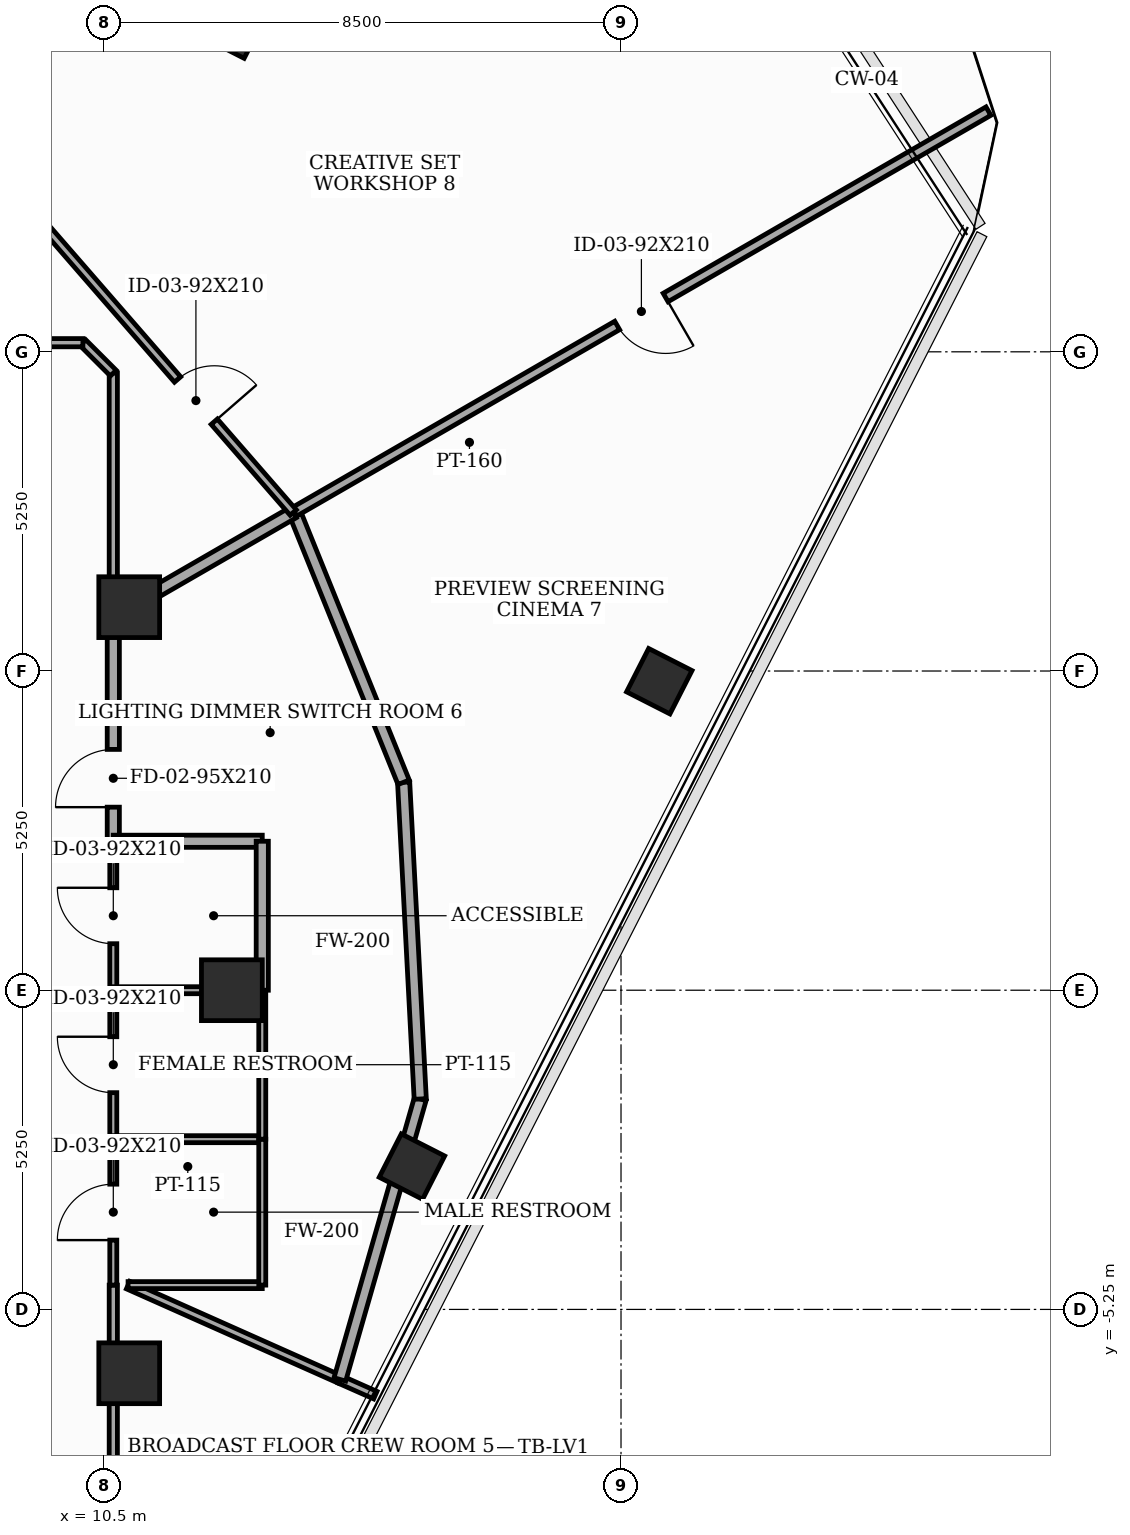
"""IFC4 building model, lengths in metres.
Left out: names, types, materials, properties, quantities, classifications, styles, units other than length and angle.
Written with IfcOpenShell. Run it as: python <this file> out.ifc"""

import sys

from ifc_helpers import new_model, si_unit, direction, frame, frame_2d, origin, origin_2d, place, context, subcontext, project, spatial, rectangle, extrude, element, fill, save


model = new_model("IFC4")
c1 = context("Model", 3, precision=1e-05, world=origin(), true_north=direction((0.0, 1.0)))
c2 = subcontext(c1, "Body", "Model", "MODEL_VIEW")
j1 = project(units=[si_unit("LENGTHUNIT", "METRE"), si_unit("PLANEANGLEUNIT", "RADIAN")], contexts=[c1])
p1 = place(None, origin())
s1 = spatial("IfcSite", under=j1, at=p1, CompositionType="ELEMENT")
p2 = place(p1, origin())
s2 = spatial("IfcBuilding", under=s1, at=p2, CompositionType="ELEMENT")
p3 = place(p2, frame((0.0, 0.0, 270.7)))
s3 = spatial("IfcBuildingStorey", under=s2, at=p3, CompositionType="ELEMENT", Elevation=270.7)
for number, where, z_axis, x_axis in (
    (1, (12.6, 0.0, 0.0), (0.0, 0.0, 1.0), (1.0, 0.0, 0.0)),
    (2, (10.912, 6.3, 0.0), (0.0, 0.0, 1.0), (1.0, 0.0, 0.0)),
    (3, (10.912, -6.3, 0.0), (0.0, 0.0, 1.0), (1.0, 0.0, 0.0)),
):
    element("IfcColumn", number, at=place(p3, frame(where, z_axis=z_axis, x_axis=x_axis)), inside=s3, PredefinedType="COLUMN", context=c2, shape_type="SweptSolid", body=[
        extrude(rectangle(XDim=1.0, YDim=1.0, at=origin_2d()), origin(), (0.0, 0.0, 1.0), 3.7),
    ])
for number, where, z_axis, x_axis in (
    (4, (15.562, -2.901, 0.0), (0.0, 0.0, 1.0), (0.454, 0.891, 0.0)),
    (5, (19.629, 5.082, 0.0), (0.0, 0.0, 1.0), (0.454, 0.891, 0.0)),
    (6, (12.627, 15.865, 0.0), (0.0, 0.0, 1.0), (0.454, 0.891, 0.0)),
):
    element("IfcColumn", number, at=place(p3, frame(where, z_axis=z_axis, x_axis=x_axis)), inside=s3, PredefinedType="COLUMN", context=c2, shape_type="SweptSolid", body=[
        extrude(rectangle(XDim=0.8, YDim=0.8, at=origin_2d()), origin(), (0.0, 0.0, 1.0), 3.7),
    ])
p4 = place(p3, frame((10.65, -10.15, 0.0), z_axis=(0.0, 0.0, 1.0), x_axis=(0.0, 1.0, 0.0)))
e7 = element("IfcWall", 7, at=p4, inside=s3, PredefinedType="PARTITIONING", context=c2, shape_type="SweptSolid", body=[
    extrude(rectangle(XDim=5.3, YDim=0.135, at=frame_2d((2.65, 0.0))), origin(), (0.0, 0.0, 1.0), 2.885),
])
p5 = place(p3, frame((10.65, -4.85, 0.0), z_axis=(0.0, 0.0, 1.0), x_axis=(0.0, 1.0, 0.0)))
e8 = element("IfcWall", 8, at=p5, inside=s3, PredefinedType="PARTITIONING", context=c2, shape_type="SweptSolid", body=[
    extrude(rectangle(XDim=2.4, YDim=0.115, at=frame_2d((1.2, 0.0))), origin(), (0.0, 0.0, 1.0), 3.5),
])
p6 = place(p5, frame((0.74, 0.0, 0.0)))
e9 = element("IfcOpeningElement", 9, at=p6, cuts=e8, PredefinedType="OPENING", context=c2, shape_type="SweptSolid", body=[
    extrude(rectangle(XDim=0.92, YDim=2.1, at=frame_2d((0.46, 1.05))), frame((0.0, 0.067, 0.0), z_axis=(0.0, -1.0, 0.0), x_axis=(1.0, 0.0, 0.0)), (0.0, 0.0, 1.0), 0.135),
])
p7 = place(p3, frame((10.65, -2.45, 0.0), z_axis=(0.0, 0.0, 1.0), x_axis=(0.0, 1.0, 0.0)))
e10 = element("IfcWall", 10, at=p7, inside=s3, PredefinedType="PARTITIONING", context=c2, shape_type="SweptSolid", body=[
    extrude(rectangle(XDim=2.45, YDim=0.115, at=frame_2d((1.225, 0.0))), origin(), (0.0, 0.0, 1.0), 2.885),
])
p8 = place(p7, frame((0.765, 0.0, 0.0)))
e11 = element("IfcOpeningElement", 11, at=p8, cuts=e10, PredefinedType="OPENING", context=c2, shape_type="SweptSolid", body=[
    extrude(rectangle(XDim=0.92, YDim=2.1, at=frame_2d((0.46, 1.05))), frame((0.0, 0.067, 0.0), z_axis=(0.0, -1.0, 0.0), x_axis=(1.0, 0.0, 0.0)), (0.0, 0.0, 1.0), 0.135),
])
p9 = place(p3, frame((10.65, 2.45, 0.0), z_axis=(0.0, 0.0, 1.0), x_axis=(0.0, 1.0, 0.0)))
e12 = element("IfcWall", 12, at=p9, inside=s3, PredefinedType="SOLIDWALL", context=c2, shape_type="SweptSolid", body=[
    extrude(rectangle(XDim=3.699, YDim=0.2, at=frame_2d((1.85, 0.0))), origin(), (0.0, 0.0, 1.0), 3.5),
])
p10 = place(p9, frame((0.561, 0.0, 0.0)))
e13 = element("IfcOpeningElement", 13, at=p10, cuts=e12, PredefinedType="OPENING", context=c2, shape_type="SweptSolid", body=[
    extrude(rectangle(XDim=0.95, YDim=2.1, at=frame_2d((0.475, 1.05))), frame((0.0, 0.11, 0.0), z_axis=(0.0, -1.0, 0.0), x_axis=(1.0, 0.0, 0.0)), (0.0, 0.0, 1.0), 0.22),
])
p11 = place(p3, frame((10.65, 0.0, 0.0), z_axis=(0.0, 0.0, 1.0), x_axis=(0.0, 1.0, 0.0)))
e14 = element("IfcWall", 14, at=p11, inside=s3, PredefinedType="PARTITIONING", context=c2, shape_type="SweptSolid", body=[
    extrude(rectangle(XDim=2.45, YDim=0.115, at=frame_2d((1.225, 0.0))), origin(), (0.0, 0.0, 1.0), 2.885),
])
p12 = place(p11, frame((0.765, 0.0, 0.0)))
e15 = element("IfcOpeningElement", 15, at=p12, cuts=e14, PredefinedType="OPENING", context=c2, shape_type="SweptSolid", body=[
    extrude(rectangle(XDim=0.92, YDim=2.1, at=frame_2d((0.46, 1.05))), frame((0.0, 0.067, 0.0), z_axis=(0.0, -1.0, 0.0), x_axis=(1.0, 0.0, 0.0)), (0.0, 0.0, 1.0), 0.135),
])
p13 = place(p3, frame((10.65, 6.149, 0.0), z_axis=(0.0, 0.0, 1.0), x_axis=(0.0, 1.0, 0.0)))
e16 = element("IfcWall", 16, at=p13, inside=s3, PredefinedType="PARTITIONING", context=c2, shape_type="SweptSolid", body=[
    extrude(rectangle(XDim=4.001, YDim=0.135, at=frame_2d((2.0, 0.0))), origin(), (0.0, 0.0, 1.0), 2.885),
])
p14 = place(p3, frame((10.65, 10.15, 0.0), z_axis=(0.0, 0.0, 1.0), x_axis=(-0.707106781187, 0.707106781187, 0.0)))
e17 = element("IfcWall", 17, at=p14, inside=s3, PredefinedType="PARTITIONING", context=c2, shape_type="SweptSolid", body=[
    extrude(rectangle(XDim=0.707, YDim=0.135, at=frame_2d((0.354, 0.0))), origin(), (0.0, 0.0, 1.0), 3.5),
])
p15 = place(p3, frame((10.15, 10.65, 0.0), z_axis=(0.0, 0.0, 1.0), x_axis=(-1.0, 0.0, 0.0)))
e18 = element("IfcWall", 18, at=p15, inside=s3, PredefinedType="PARTITIONING", context=c2, shape_type="SweptSolid", body=[
    extrude(rectangle(XDim=11.3, YDim=0.135, at=frame_2d((5.65, 0.0))), origin(), (0.0, 0.0, 1.0), 2.885),
])
p16 = place(p15, frame((6.531, 0.0, 0.0)))
e19 = element("IfcOpeningElement", 19, at=p16, cuts=e18, PredefinedType="OPENING", context=c2, shape_type="SweptSolid", body=[
    extrude(rectangle(XDim=0.95, YDim=2.1, at=frame_2d((0.475, 1.05))), frame((0.0, 0.077, 0.0), z_axis=(0.0, -1.0, 0.0), x_axis=(1.0, 0.0, 0.0)), (0.0, 0.0, 1.0), 0.155),
])
p17 = place(p3, frame((14.376, -6.401, 0.0), z_axis=(0.0, 0.0, 1.0), x_axis=(-0.913536711347, 0.406756287009, 0.0)))
e20 = element("IfcWall", 20, at=p17, inside=s3, PredefinedType="PARTITIONING", context=c2, shape_type="SweptSolid", body=[
    extrude(rectangle(XDim=3.812, YDim=0.135, at=frame_2d((1.906, 0.0))), origin(), (0.0, 0.0, 1.0), 2.885),
])
p18 = place(p3, frame((14.959, -6.66, 0.0), z_axis=(0.0, 0.0, 1.0), x_axis=(-0.913843080804, 0.406067511219, 0.0)))
e21 = element("IfcWall", 21, at=p18, inside=s3, PredefinedType="PARTITIONING", context=c2, shape_type="SweptSolid", body=[
    extrude(rectangle(XDim=0.638, YDim=0.135, at=frame_2d((0.319, 0.0))), origin(), (0.0, 0.0, 1.0), 3.5),
])
p19 = place(p3, frame((13.1, -2.45, 0.0), z_axis=(0.0, 0.0, 1.0), x_axis=(-1.0, 0.0, 0.0)))
e22 = element("IfcWall", 22, at=p19, inside=s3, PredefinedType="PARTITIONING", context=c2, shape_type="SweptSolid", body=[
    extrude(rectangle(XDim=2.45, YDim=0.115, at=frame_2d((1.225, 0.0))), origin(), (0.0, 0.0, 1.0), 2.885),
])
p20 = place(p3, frame((10.893, -4.85, 0.0), z_axis=(0.0, 0.0, 1.0), x_axis=(1.0, 0.0, 0.0)))
e23 = element("IfcWall", 23, at=p20, inside=s3, PredefinedType="PARTITIONING", context=c2, shape_type="SweptSolid", body=[
    extrude(rectangle(XDim=2.207, YDim=0.115, at=frame_2d((1.104, 0.0))), origin(), (0.0, 0.0, 1.0), 2.885),
])
p21 = place(p3, frame((13.1, -4.85, 0.0), z_axis=(0.0, 0.0, 1.0), x_axis=(0.0, 1.0, 0.0)))
e24 = element("IfcWall", 24, at=p21, inside=s3, PredefinedType="PARTITIONING", context=c2, shape_type="SweptSolid", body=[
    extrude(rectangle(XDim=2.4, YDim=0.115, at=frame_2d((1.2, 0.0))), origin(), (0.0, 0.0, 1.0), 3.5),
])
p22 = place(p3, frame((13.1, -2.45, 0.0), z_axis=(0.0, 0.0, 1.0), x_axis=(0.0, 1.0, 0.0)))
e25 = element("IfcWall", 25, at=p22, inside=s3, PredefinedType="PARTITIONING", context=c2, shape_type="SweptSolid", body=[
    extrude(rectangle(XDim=2.45, YDim=0.115, at=frame_2d((1.225, 0.0))), origin(), (0.0, 0.0, 1.0), 3.035),
])
p23 = place(p3, frame((13.1, 0.0, 0.0), z_axis=(0.0, 0.0, 1.0), x_axis=(-1.0, 0.0, 0.0)))
e26 = element("IfcWall", 26, at=p23, inside=s3, PredefinedType="PARTITIONING", context=c2, shape_type="SweptSolid", body=[
    extrude(rectangle(XDim=2.45, YDim=0.115, at=frame_2d((1.225, 0.0))), origin(), (0.0, 0.0, 1.0), 2.885),
])
p24 = place(p3, frame((10.65, 2.45, 0.0), z_axis=(0.0, 0.0, 1.0), x_axis=(1.0, 0.0, 0.0)))
e27 = element("IfcWall", 27, at=p24, inside=s3, PredefinedType="SOLIDWALL", context=c2, shape_type="SweptSolid", body=[
    extrude(rectangle(XDim=2.45, YDim=0.2, at=frame_2d((1.225, 0.0))), origin(), (0.0, 0.0, 1.0), 2.885),
])
p25 = place(p3, frame((13.1, 2.45, 0.0), z_axis=(0.0, 0.0, 1.0), x_axis=(0.0, -1.0, 0.0)))
e28 = element("IfcWall", 28, at=p25, inside=s3, PredefinedType="SOLIDWALL", context=c2, shape_type="SweptSolid", body=[
    extrude(rectangle(XDim=2.45, YDim=0.2, at=frame_2d((1.225, 0.0))), origin(), (0.0, 0.0, 1.0), 3.035),
])
p26 = place(p3, frame((14.376, -6.401, 0.0), z_axis=(0.0, 0.0, 1.0), x_axis=(0.275561163163, 0.961283540562, 0.0)))
e29 = element("IfcWall", 29, at=p26, inside=s3, PredefinedType="SOLIDWALL", context=c2, shape_type="SweptSolid", body=[
    extrude(rectangle(XDim=4.798, YDim=0.2, at=frame_2d((2.399, 0.0))), origin(), (0.0, 0.0, 1.0), 3.035),
])
p27 = place(p3, frame((15.698, -1.789, 0.0), z_axis=(0.0, 0.0, 1.0), x_axis=(-0.052327910164, 0.998629956399, 0.0)))
e30 = element("IfcWall", 30, at=p27, inside=s3, PredefinedType="SOLIDWALL", context=c2, shape_type="SweptSolid", body=[
    extrude(rectangle(XDim=5.216, YDim=0.2, at=frame_2d((2.608, 0.0))), origin(), (0.0, 0.0, 1.0), 3.035),
])
p28 = place(p3, frame((15.425, 3.42, 0.0), z_axis=(0.0, 0.0, 1.0), x_axis=(-0.374591900922, 0.927189790584, 0.0)))
e31 = element("IfcWall", 31, at=p28, inside=s3, PredefinedType="SOLIDWALL", context=c2, shape_type="SweptSolid", body=[
    extrude(rectangle(XDim=4.73, YDim=0.2, at=frame_2d((2.365, 0.0))), origin(), (0.0, 0.0, 1.0), 3.185),
])
p29 = place(p3, frame((13.609, 7.857, 0.0), z_axis=(0.0, 0.0, 1.0), x_axis=(-0.866071357471, -0.499920397431, 0.0)))
e32 = element("IfcWall", 32, at=p29, inside=s3, PredefinedType="SOLIDWALL", context=c2, shape_type="SweptSolid", body=[
    extrude(rectangle(XDim=3.417, YDim=0.2, at=frame_2d((1.708, 0.0))), origin(), (0.0, 0.0, 1.0), 2.885),
])
p30 = place(p3, frame((25.042, 14.458, 0.0), z_axis=(0.0, 0.0, 1.0), x_axis=(-0.866012847166, -0.50002174807, 0.0)))
e33 = element("IfcWall", 33, at=p30, inside=s3, PredefinedType="PARTITIONING", context=c2, shape_type="SweptSolid", body=[
    extrude(rectangle(XDim=13.181, YDim=0.16, at=frame_2d((6.59, 0.0))), origin(), (0.0, 0.0, 1.0), 3.035),
])
p31 = place(p30, frame((6.13, 0.0, 0.0)))
e34 = element("IfcOpeningElement", 34, at=p31, cuts=e33, PredefinedType="OPENING", context=c2, shape_type="SweptSolid", body=[
    extrude(rectangle(XDim=0.92, YDim=2.1, at=frame_2d((0.46, 1.05))), frame((0.0, 0.09, 0.0), z_axis=(0.0, -1.0, 0.0), x_axis=(1.0, 0.0, 0.0)), (0.0, 0.0, 1.0), 0.18),
])
p32 = place(p3, frame((9.398, 12.701, 0.0), z_axis=(0.0, 0.0, 1.0), x_axis=(0.656069468174, -0.754700505452, 0.0)))
e35 = element("IfcWall", 35, at=p32, inside=s3, PredefinedType="PARTITIONING", context=c2, shape_type="SweptSolid", body=[
    extrude(rectangle(XDim=6.418, YDim=0.135, at=frame_2d((3.209, 0.0))), origin(), (0.0, 0.0, 1.0), 3.185),
])
p33 = place(p32, frame((3.52, 0.0, 0.0)))
e36 = element("IfcOpeningElement", 36, at=p33, cuts=e35, PredefinedType="OPENING", context=c2, shape_type="SweptSolid", body=[
    extrude(rectangle(XDim=0.92, YDim=2.1, at=frame_2d((0.46, 1.05))), frame((0.0, 0.077, 0.0), z_axis=(0.0, -1.0, 0.0), x_axis=(1.0, 0.0, 0.0)), (0.0, 0.0, 1.0), 0.155),
])
p34 = place(p6, origin())
e37 = element("IfcDoor", 37, at=p34, inside=s3, OperationType="SINGLE_SWING_LEFT", PredefinedType="DOOR", context=c2, shape_type="SweptSolid", body=[
    extrude(rectangle(XDim=0.92, YDim=2.1, at=frame_2d((0.46, 1.05))), frame((0.0, 0.025, 0.0), z_axis=(0.0, -1.0, 0.0), x_axis=(1.0, 0.0, 0.0)), (0.0, 0.0, 1.0), 0.05),
])
fill(e9, e37)
p35 = place(p8, origin())
e38 = element("IfcDoor", 38, at=p35, inside=s3, OperationType="SINGLE_SWING_RIGHT", PredefinedType="DOOR", context=c2, shape_type="SweptSolid", body=[
    extrude(rectangle(XDim=0.92, YDim=2.1, at=frame_2d((0.46, 1.05))), frame((0.0, 0.025, 0.0), z_axis=(0.0, -1.0, 0.0), x_axis=(1.0, 0.0, 0.0)), (0.0, 0.0, 1.0), 0.05),
])
fill(e11, e38)
p36 = place(p10, origin())
e39 = element("IfcDoor", 39, at=p36, inside=s3, OperationType="SINGLE_SWING_LEFT", PredefinedType="DOOR", context=c2, shape_type="SweptSolid", body=[
    extrude(rectangle(XDim=0.95, YDim=2.1, at=frame_2d((0.475, 1.05))), frame((0.0, 0.025, 0.0), z_axis=(0.0, -1.0, 0.0), x_axis=(1.0, 0.0, 0.0)), (0.0, 0.0, 1.0), 0.05),
])
fill(e13, e39)
p37 = place(p12, origin())
e40 = element("IfcDoor", 40, at=p37, inside=s3, OperationType="SINGLE_SWING_RIGHT", PredefinedType="DOOR", context=c2, shape_type="SweptSolid", body=[
    extrude(rectangle(XDim=0.92, YDim=2.1, at=frame_2d((0.46, 1.05))), frame((0.0, 0.025, 0.0), z_axis=(0.0, -1.0, 0.0), x_axis=(1.0, 0.0, 0.0)), (0.0, 0.0, 1.0), 0.05),
])
fill(e15, e40)
p38 = place(p31, origin())
e41 = element("IfcDoor", 41, at=p38, inside=s3, OperationType="SINGLE_SWING_LEFT", PredefinedType="DOOR", context=c2, shape_type="SweptSolid", body=[
    extrude(rectangle(XDim=0.92, YDim=2.1, at=frame_2d((0.46, 1.05))), frame((0.0, 0.025, 0.0), z_axis=(0.0, -1.0, 0.0), x_axis=(1.0, 0.0, 0.0)), (0.0, 0.0, 1.0), 0.05),
])
fill(e34, e41)
p39 = place(p33, origin())
e42 = element("IfcDoor", 42, at=p39, inside=s3, OperationType="SINGLE_SWING_RIGHT", PredefinedType="DOOR", context=c2, shape_type="SweptSolid", body=[
    extrude(rectangle(XDim=0.92, YDim=2.1, at=frame_2d((0.46, 1.05))), frame((0.0, 0.025, 0.0), z_axis=(0.0, -1.0, 0.0), x_axis=(1.0, 0.0, 0.0)), (0.0, 0.0, 1.0), 0.05),
])
fill(e36, e42)
save(model, sys.argv[1])
